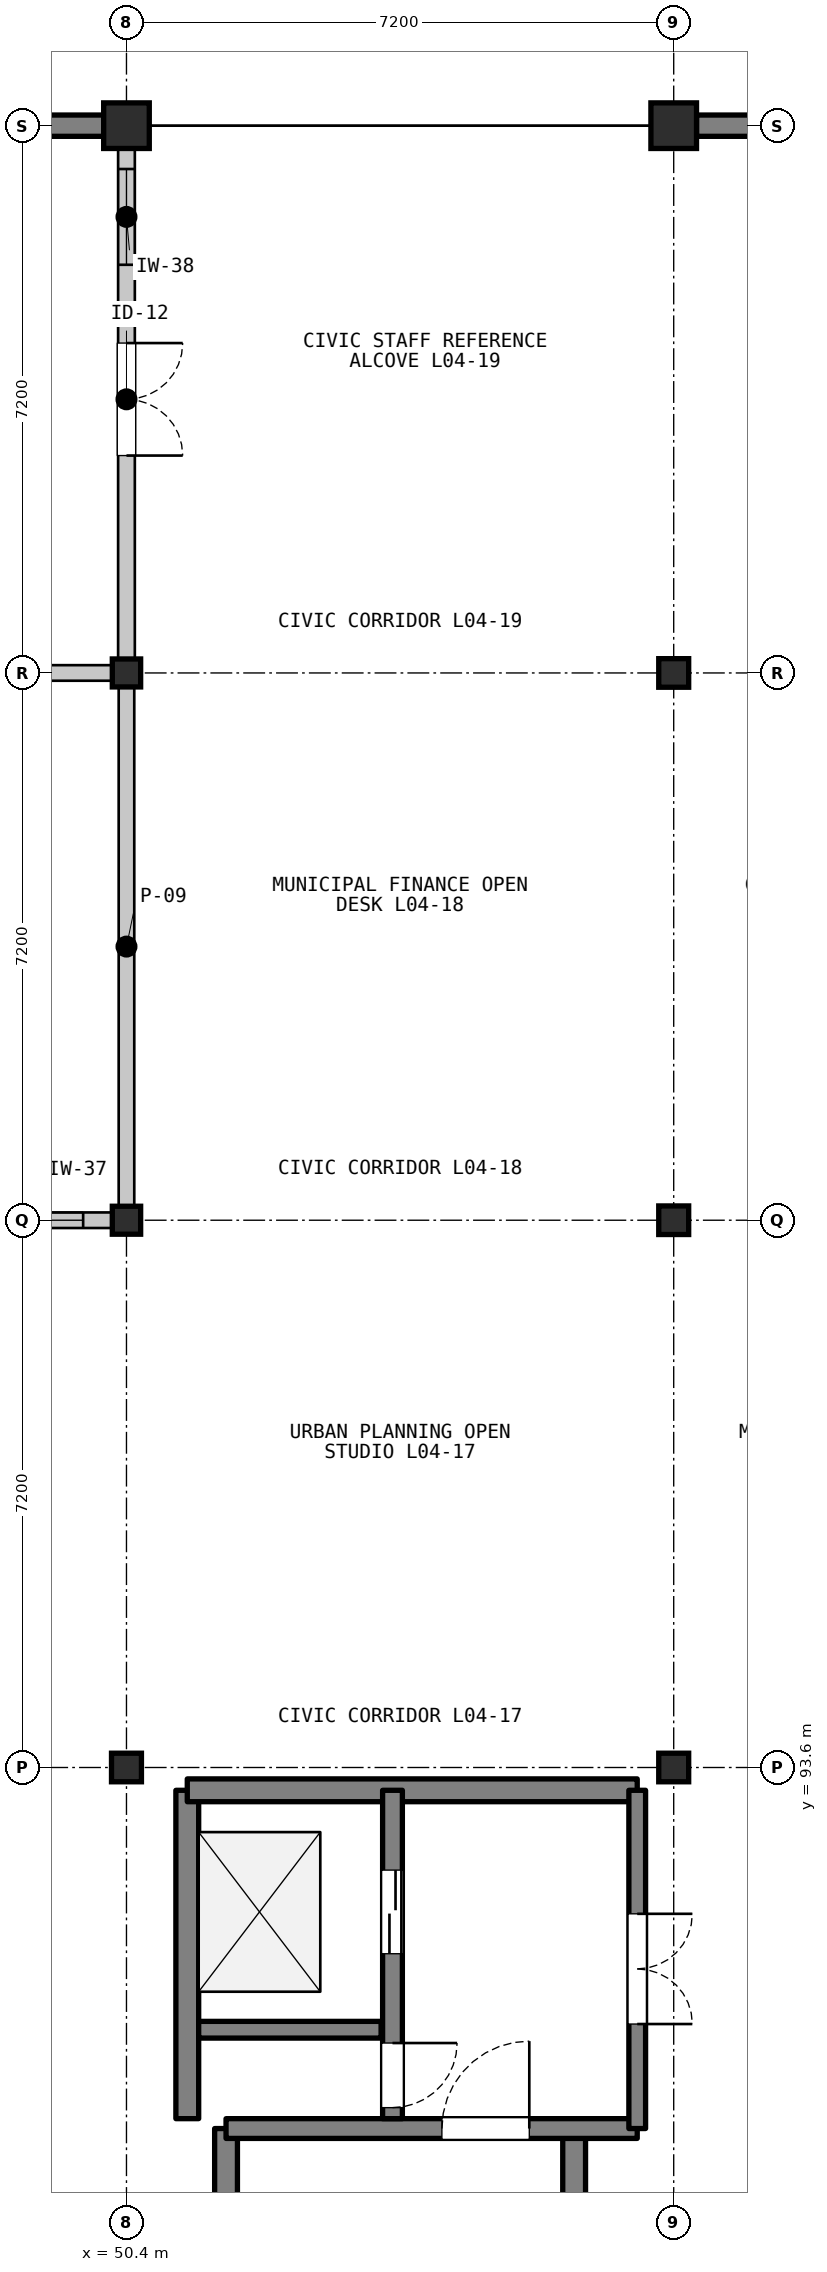
"""IFC4 building model, lengths in metres.
Left out: names, types, materials, properties, quantities, classifications, styles, units other than length and angle.
Written with IfcOpenShell. Run it as: python <this file> out.ifc"""

import sys

from ifc_helpers import new_model, si_unit, direction, frame, frame_2d, origin, origin_2d, place, context, subcontext, project, spatial, rectangle, i_section, extrude, element, fill, save


model = new_model("IFC4")
c1 = context("Model", 3, precision=1e-05, world=origin(), true_north=direction((0.0, 1.0)))
c2 = subcontext(c1, "Body", "Model", "MODEL_VIEW")
j1 = project(units=[si_unit("LENGTHUNIT", "METRE"), si_unit("PLANEANGLEUNIT", "RADIAN")], contexts=[c1])
p1 = place(None, origin())
s1 = spatial("IfcSite", under=j1, at=p1, CompositionType="ELEMENT")
p2 = place(p1, origin())
s2 = spatial("IfcBuilding", under=s1, at=p2, CompositionType="ELEMENT")
p3 = place(p2, frame((0.0, 0.0, 14.1)))
s3 = spatial("IfcBuildingStorey", under=s2, at=p3, CompositionType="ELEMENT", Elevation=14.1)
p4 = place(p3, frame((50.4, 93.6, 0.0), z_axis=(0.0, 0.0, 1.0), x_axis=(1.0, 0.0, 0.0)))
e1 = element("IfcColumn", 1, at=p4, inside=s3, PredefinedType="COLUMN", context=c2, shape_type="SweptSolid", body=[
    extrude(i_section(OverallWidth=0.394, OverallDepth=0.376, WebThickness=0.017, FlangeThickness=0.028, FilletRadius=0.015, at=origin_2d()), origin(), (0.0, 0.0, 1.0), 3.9),
])
for number, where, z_axis, x_axis in (
    (2, (50.4, 100.8, 0.0), (0.0, 0.0, 1.0), (1.0, 0.0, 0.0)),
    (3, (50.4, 108.0, 0.0), (0.0, 0.0, 1.0), (1.0, 0.0, 0.0)),
):
    element("IfcColumn", number, at=place(p3, frame(where, z_axis=z_axis, x_axis=x_axis)), inside=s3, PredefinedType="COLUMN", context=c2, shape_type="SweptSolid", body=[
        extrude(i_section(OverallWidth=0.373, OverallDepth=0.368, WebThickness=0.015, FlangeThickness=0.024, FilletRadius=0.015, at=origin_2d()), origin(), (0.0, 0.0, 1.0), 3.9),
    ])
p5 = place(p3, frame((50.4, 115.2, 0.0), z_axis=(0.0, 0.0, 1.0), x_axis=(1.0, 0.0, 0.0)))
e4 = element("IfcColumn", 4, at=p5, inside=s3, PredefinedType="COLUMN", context=c2, shape_type="SweptSolid", body=[
    extrude(rectangle(XDim=0.6, YDim=0.6, at=origin_2d()), origin(), (0.0, 0.0, 1.0), 3.9),
])
for number, where, z_axis, x_axis in (
    (5, (57.6, 93.6, 0.0), (0.0, 0.0, 1.0), (1.0, 0.0, 0.0)),
    (6, (57.6, 100.8, 0.0), (0.0, 0.0, 1.0), (1.0, 0.0, 0.0)),
    (7, (57.6, 108.0, 0.0), (0.0, 0.0, 1.0), (1.0, 0.0, 0.0)),
):
    element("IfcColumn", number, at=place(p3, frame(where, z_axis=z_axis, x_axis=x_axis)), inside=s3, PredefinedType="COLUMN", context=c2, shape_type="SweptSolid", body=[
        extrude(i_section(OverallWidth=0.394, OverallDepth=0.376, WebThickness=0.017, FlangeThickness=0.028, FilletRadius=0.015, at=origin_2d()), origin(), (0.0, 0.0, 1.0), 3.9),
    ])
p6 = place(p3, frame((57.6, 115.2, 0.0), z_axis=(0.0, 0.0, 1.0), x_axis=(1.0, 0.0, 0.0)))
e8 = element("IfcColumn", 8, at=p6, inside=s3, PredefinedType="COLUMN", context=c2, shape_type="SweptSolid", body=[
    extrude(rectangle(XDim=0.6, YDim=0.6, at=origin_2d()), origin(), (0.0, 0.0, 1.0), 3.9),
])
p7 = place(p3, frame((43.45, 115.2, 0.0), z_axis=(0.0, 0.0, 1.0), x_axis=(1.0, 0.0, 0.0)))
e9 = element("IfcWall", 9, at=p7, inside=s3, PredefinedType="SOLIDWALL", context=c2, shape_type="SweptSolid", body=[
    extrude(rectangle(XDim=6.65, YDim=0.28, at=frame_2d((3.325, 0.0))), origin(), (0.0, 0.0, 1.0), 3.118),
])
p8 = place(p7, frame((0.996, 0.0, 0.95)))
e10 = element("IfcOpeningElement", 10, at=p8, cuts=e9, PredefinedType="OPENING", context=c2, shape_type="SweptSolid", body=[
    extrude(rectangle(XDim=1.2, YDim=1.7, at=frame_2d((0.6, 0.85))), frame((0.0, 0.15, 0.0), z_axis=(0.0, -1.0, 0.0), x_axis=(1.0, 0.0, 0.0)), (0.0, 0.0, 1.0), 0.3),
])
p9 = place(p7, frame((4.454, 0.0, 0.95)))
e11 = element("IfcOpeningElement", 11, at=p9, cuts=e9, PredefinedType="OPENING", context=c2, shape_type="SweptSolid", body=[
    extrude(rectangle(XDim=1.2, YDim=1.7, at=frame_2d((0.6, 0.85))), frame((0.0, 0.15, 0.0), z_axis=(0.0, -1.0, 0.0), x_axis=(1.0, 0.0, 0.0)), (0.0, 0.0, 1.0), 0.3),
])
p10 = place(p3, frame((57.9, 115.2, 0.0), z_axis=(0.0, 0.0, 1.0), x_axis=(1.0, 0.0, 0.0)))
e12 = element("IfcWall", 12, at=p10, inside=s3, PredefinedType="SOLIDWALL", context=c2, shape_type="SweptSolid", body=[
    extrude(rectangle(XDim=6.6, YDim=0.28, at=frame_2d((3.3, 0.0))), origin(), (0.0, 0.0, 1.0), 3.118),
])
p11 = place(p10, frame((0.984, 0.0, 0.95)))
e13 = element("IfcOpeningElement", 13, at=p11, cuts=e12, PredefinedType="OPENING", context=c2, shape_type="SweptSolid", body=[
    extrude(rectangle(XDim=1.2, YDim=1.7, at=frame_2d((0.6, 0.85))), frame((0.0, 0.15, 0.0), z_axis=(0.0, -1.0, 0.0), x_axis=(1.0, 0.0, 0.0)), (0.0, 0.0, 1.0), 0.3),
])
p12 = place(p10, frame((4.416, 0.0, 0.95)))
e14 = element("IfcOpeningElement", 14, at=p12, cuts=e12, PredefinedType="OPENING", context=c2, shape_type="SweptSolid", body=[
    extrude(rectangle(XDim=1.2, YDim=1.7, at=frame_2d((0.6, 0.85))), frame((0.0, 0.15, 0.0), z_axis=(0.0, -1.0, 0.0), x_axis=(1.0, 0.0, 0.0)), (0.0, 0.0, 1.0), 0.3),
])
for number, where, z_axis, x_axis in (
    (15, (51.71, 79.55, 0.0), (0.0, 0.0, 1.0), (0.0, 1.0, 0.0)),
    (16, (56.29, 79.55, 0.0), (0.0, 0.0, 1.0), (0.0, 1.0, 0.0)),
):
    element("IfcWall", number, at=place(p3, frame(where, z_axis=z_axis, x_axis=x_axis)), inside=s3, PredefinedType="SHEAR", context=c2, shape_type="SweptSolid", body=[
        extrude(rectangle(XDim=9.3, YDim=0.3, at=frame_2d((4.65, 0.0))), origin(), (0.0, 0.0, 1.0), 3.72),
    ])
p13 = place(p3, frame((51.71, 88.85, 0.0), z_axis=(0.0, 0.0, 1.0), x_axis=(1.0, 0.0, 0.0)))
e17 = element("IfcWall", 17, at=p13, inside=s3, PredefinedType="SHEAR", context=c2, shape_type="SweptSolid", body=[
    extrude(rectangle(XDim=5.41, YDim=0.26, at=frame_2d((2.705, 0.0))), origin(), (0.0, 0.0, 1.0), 3.72),
])
p14 = place(p13, frame((2.84, 0.0, 0.0)))
e18 = element("IfcOpeningElement", 18, at=p14, cuts=e17, PredefinedType="OPENING", context=c2, shape_type="SweptSolid", body=[
    extrude(rectangle(XDim=1.15, YDim=2.15, at=frame_2d((0.575, 1.075))), frame((0.0, 0.14, 0.0), z_axis=(0.0, -1.0, 0.0), x_axis=(1.0, 0.0, 0.0)), (0.0, 0.0, 1.0), 0.28),
])
p15 = place(p3, frame((51.2, 88.98, 0.0), z_axis=(0.0, 0.0, 1.0), x_axis=(0.0, 1.0, 0.0)))
e19 = element("IfcWall", 19, at=p15, inside=s3, PredefinedType="SHEAR", context=c2, shape_type="SweptSolid", body=[
    extrude(rectangle(XDim=4.32, YDim=0.3, at=frame_2d((2.16, 0.0))), origin(), (0.0, 0.0, 1.0), 3.72),
])
p16 = place(p3, frame((51.2, 93.3, 0.0), z_axis=(0.0, 0.0, 1.0), x_axis=(1.0, 0.0, 0.0)))
e20 = element("IfcWall", 20, at=p16, inside=s3, PredefinedType="SHEAR", context=c2, shape_type="SweptSolid", body=[
    extrude(rectangle(XDim=5.92, YDim=0.3, at=frame_2d((2.96, 0.0))), origin(), (0.0, 0.0, 1.0), 3.72),
])
p17 = place(p3, frame((51.35, 90.15, 0.0), z_axis=(0.0, 0.0, 1.0), x_axis=(1.0, 0.0, 0.0)))
e21 = element("IfcWall", 21, at=p17, inside=s3, PredefinedType="SHEAR", context=c2, shape_type="SweptSolid", body=[
    extrude(rectangle(XDim=2.4, YDim=0.22, at=frame_2d((1.2, 0.0))), origin(), (0.0, 0.0, 1.0), 3.72),
])
p18 = place(p3, frame((53.9, 93.3, 0.0), z_axis=(0.0, 0.0, 1.0), x_axis=(0.0, -1.0, 0.0)))
e22 = element("IfcWall", 22, at=p18, inside=s3, PredefinedType="SHEAR", context=c2, shape_type="SweptSolid", body=[
    extrude(rectangle(XDim=4.32, YDim=0.26, at=frame_2d((2.16, 0.0))), origin(), (0.0, 0.0, 1.0), 3.72),
])
p19 = place(p18, frame((1.05, 0.0, 0.0)))
e23 = element("IfcOpeningElement", 23, at=p19, cuts=e22, PredefinedType="OPENING", context=c2, shape_type="SweptSolid", body=[
    extrude(rectangle(XDim=1.1, YDim=2.15, at=frame_2d((0.55, 1.075))), frame((0.0, 0.14, 0.0), z_axis=(0.0, -1.0, 0.0), x_axis=(1.0, 0.0, 0.0)), (0.0, 0.0, 1.0), 0.28),
])
p20 = place(p18, frame((3.325, 0.0, 0.0)))
e24 = element("IfcOpeningElement", 24, at=p20, cuts=e22, PredefinedType="OPENING", context=c2, shape_type="SweptSolid", body=[
    extrude(rectangle(XDim=0.85, YDim=2.05, at=frame_2d((0.425, 1.025))), frame((0.0, 0.14, 0.0), z_axis=(0.0, -1.0, 0.0), x_axis=(1.0, 0.0, 0.0)), (0.0, 0.0, 1.0), 0.28),
])
p21 = place(p3, frame((57.12, 93.3, 0.0), z_axis=(0.0, 0.0, 1.0), x_axis=(0.0, -1.0, 0.0)))
e25 = element("IfcWall", 25, at=p21, inside=s3, PredefinedType="SHEAR", context=c2, shape_type="SweptSolid", body=[
    extrude(rectangle(XDim=4.45, YDim=0.22, at=frame_2d((2.225, 0.0))), origin(), (0.0, 0.0, 1.0), 3.72),
])
p22 = place(p21, frame((1.625, 0.0, 0.0)))
e26 = element("IfcOpeningElement", 26, at=p22, cuts=e25, PredefinedType="OPENING", context=c2, shape_type="SweptSolid", body=[
    extrude(rectangle(XDim=1.45, YDim=2.2, at=frame_2d((0.725, 1.1))), frame((0.0, 0.12, 0.0), z_axis=(0.0, -1.0, 0.0), x_axis=(1.0, 0.0, 0.0)), (0.0, 0.0, 1.0), 0.24),
])
p23 = place(p3, frame((50.28, 100.8, 0.0), z_axis=(0.0, 0.0, 1.0), x_axis=(-1.0, 0.0, 0.0)))
e27 = element("IfcWall", 27, at=p23, inside=s3, PredefinedType="PARTITIONING", context=c2, shape_type="SweptSolid", body=[
    extrude(rectangle(XDim=6.96, YDim=0.205, at=frame_2d((3.48, 0.0))), origin(), (0.0, 0.0, 1.0), 3.108),
])
p24 = place(p23, frame((2.9, 0.0, 0.0)))
e28 = element("IfcOpeningElement", 28, at=p24, cuts=e27, PredefinedType="OPENING", context=c2, shape_type="SweptSolid", body=[
    extrude(rectangle(XDim=1.16, YDim=2.2, at=frame_2d((0.58, 1.1))), frame((0.0, 0.113, 0.0), z_axis=(0.0, -1.0, 0.0), x_axis=(1.0, 0.0, 0.0)), (0.0, 0.0, 1.0), 0.225),
])
p25 = place(p23, frame((0.45, 0.0, 1.05)))
e29 = element("IfcOpeningElement", 29, at=p25, cuts=e27, PredefinedType="OPENING", context=c2, shape_type="SweptSolid", body=[
    extrude(rectangle(XDim=1.16, YDim=1.1, at=frame_2d((0.58, 0.55))), frame((0.0, 0.113, 0.0), z_axis=(0.0, -1.0, 0.0), x_axis=(1.0, 0.0, 0.0)), (0.0, 0.0, 1.0), 0.225),
])
for number, where, z_axis, x_axis in (
    (30, (43.32, 108.0, 0.0), (0.0, 0.0, 1.0), (1.0, 0.0, 0.0)),
    (31, (50.4, 107.88, 0.0), (0.0, 0.0, 1.0), (0.0, -1.0, 0.0)),
):
    element("IfcWall", number, at=place(p3, frame(where, z_axis=z_axis, x_axis=x_axis)), inside=s3, PredefinedType="PARTITIONING", context=c2, shape_type="SweptSolid", body=[
        extrude(rectangle(XDim=6.96, YDim=0.205, at=frame_2d((3.48, 0.0))), origin(), (0.0, 0.0, 1.0), 3.108),
    ])
p26 = place(p3, frame((50.4, 115.08, 0.0), z_axis=(0.0, 0.0, 1.0), x_axis=(0.0, -1.0, 0.0)))
e32 = element("IfcWall", 32, at=p26, inside=s3, PredefinedType="PARTITIONING", context=c2, shape_type="SweptSolid", body=[
    extrude(rectangle(XDim=6.96, YDim=0.22, at=frame_2d((3.48, 0.0))), origin(), (0.0, 0.0, 1.0), 3.108),
])
p27 = place(p26, frame((2.74, 0.0, 0.0)))
e33 = element("IfcOpeningElement", 33, at=p27, cuts=e32, PredefinedType="OPENING", context=c2, shape_type="SweptSolid", body=[
    extrude(rectangle(XDim=1.48, YDim=2.25, at=frame_2d((0.74, 1.125))), frame((0.0, 0.12, 0.0), z_axis=(0.0, -1.0, 0.0), x_axis=(1.0, 0.0, 0.0)), (0.0, 0.0, 1.0), 0.24),
])
p28 = place(p26, frame((0.45, 0.0, 1.05)))
e34 = element("IfcOpeningElement", 34, at=p28, cuts=e32, PredefinedType="OPENING", context=c2, shape_type="SweptSolid", body=[
    extrude(rectangle(XDim=1.26, YDim=1.1, at=frame_2d((0.63, 0.55))), frame((0.0, 0.12, 0.0), z_axis=(0.0, -1.0, 0.0), x_axis=(1.0, 0.0, 0.0)), (0.0, 0.0, 1.0), 0.24),
])
p29 = place(p14, origin())
e35 = element("IfcDoor", 35, at=p29, inside=s3, OperationType="SINGLE_SWING_RIGHT", PredefinedType="DOOR", context=c2, shape_type="SweptSolid", body=[
    extrude(rectangle(XDim=1.15, YDim=2.15, at=frame_2d((0.575, 1.075))), frame((0.0, 0.025, 0.0), z_axis=(0.0, -1.0, 0.0), x_axis=(1.0, 0.0, 0.0)), (0.0, 0.0, 1.0), 0.05),
])
fill(e18, e35)
p30 = place(p19, origin())
e36 = element("IfcDoor", 36, at=p30, inside=s3, OperationType="DOUBLE_DOOR_SLIDING", PredefinedType="DOOR", context=c2, shape_type="SweptSolid", body=[
    extrude(rectangle(XDim=1.1, YDim=2.15, at=frame_2d((0.55, 1.075))), frame((0.0, 0.025, 0.0), z_axis=(0.0, -1.0, 0.0), x_axis=(1.0, 0.0, 0.0)), (0.0, 0.0, 1.0), 0.05),
])
fill(e23, e36)
p31 = place(p20, origin())
e37 = element("IfcDoor", 37, at=p31, inside=s3, OperationType="SINGLE_SWING_LEFT", PredefinedType="DOOR", context=c2, shape_type="SweptSolid", body=[
    extrude(rectangle(XDim=0.85, YDim=2.05, at=frame_2d((0.425, 1.025))), frame((0.0, 0.025, 0.0), z_axis=(0.0, -1.0, 0.0), x_axis=(1.0, 0.0, 0.0)), (0.0, 0.0, 1.0), 0.05),
])
fill(e24, e37)
p32 = place(p22, origin())
e38 = element("IfcDoor", 38, at=p32, inside=s3, OperationType="DOUBLE_DOOR_SINGLE_SWING", PredefinedType="DOOR", context=c2, shape_type="SweptSolid", body=[
    extrude(rectangle(XDim=1.45, YDim=2.2, at=frame_2d((0.725, 1.1))), frame((0.0, 0.025, 0.0), z_axis=(0.0, -1.0, 0.0), x_axis=(1.0, 0.0, 0.0)), (0.0, 0.0, 1.0), 0.05),
])
fill(e26, e38)
p33 = place(p25, origin())
e39 = element("IfcWindow", 39, at=p33, inside=s3, PartitioningType="SINGLE_PANEL", PredefinedType="WINDOW", context=c2, shape_type="SweptSolid", body=[
    extrude(rectangle(XDim=1.16, YDim=1.1, at=frame_2d((0.58, 0.55))), frame((0.0, 0.03, 0.0), z_axis=(0.0, -1.0, 0.0), x_axis=(1.0, 0.0, 0.0)), (0.0, 0.0, 1.0), 0.06),
])
fill(e29, e39)
p34 = place(p27, origin())
e40 = element("IfcDoor", 40, at=p34, inside=s3, OperationType="DOUBLE_DOOR_SINGLE_SWING", PredefinedType="DOOR", context=c2, shape_type="SweptSolid", body=[
    extrude(rectangle(XDim=1.48, YDim=2.25, at=frame_2d((0.74, 1.125))), frame((0.0, 0.025, 0.0), z_axis=(0.0, -1.0, 0.0), x_axis=(1.0, 0.0, 0.0)), (0.0, 0.0, 1.0), 0.05),
])
fill(e33, e40)
p35 = place(p28, origin())
e41 = element("IfcWindow", 41, at=p35, inside=s3, PartitioningType="SINGLE_PANEL", PredefinedType="WINDOW", context=c2, shape_type="SweptSolid", body=[
    extrude(rectangle(XDim=1.26, YDim=1.1, at=frame_2d((0.63, 0.55))), frame((0.0, 0.03, 0.0), z_axis=(0.0, -1.0, 0.0), x_axis=(1.0, 0.0, 0.0)), (0.0, 0.0, 1.0), 0.06),
])
fill(e34, e41)
save(model, sys.argv[1])
